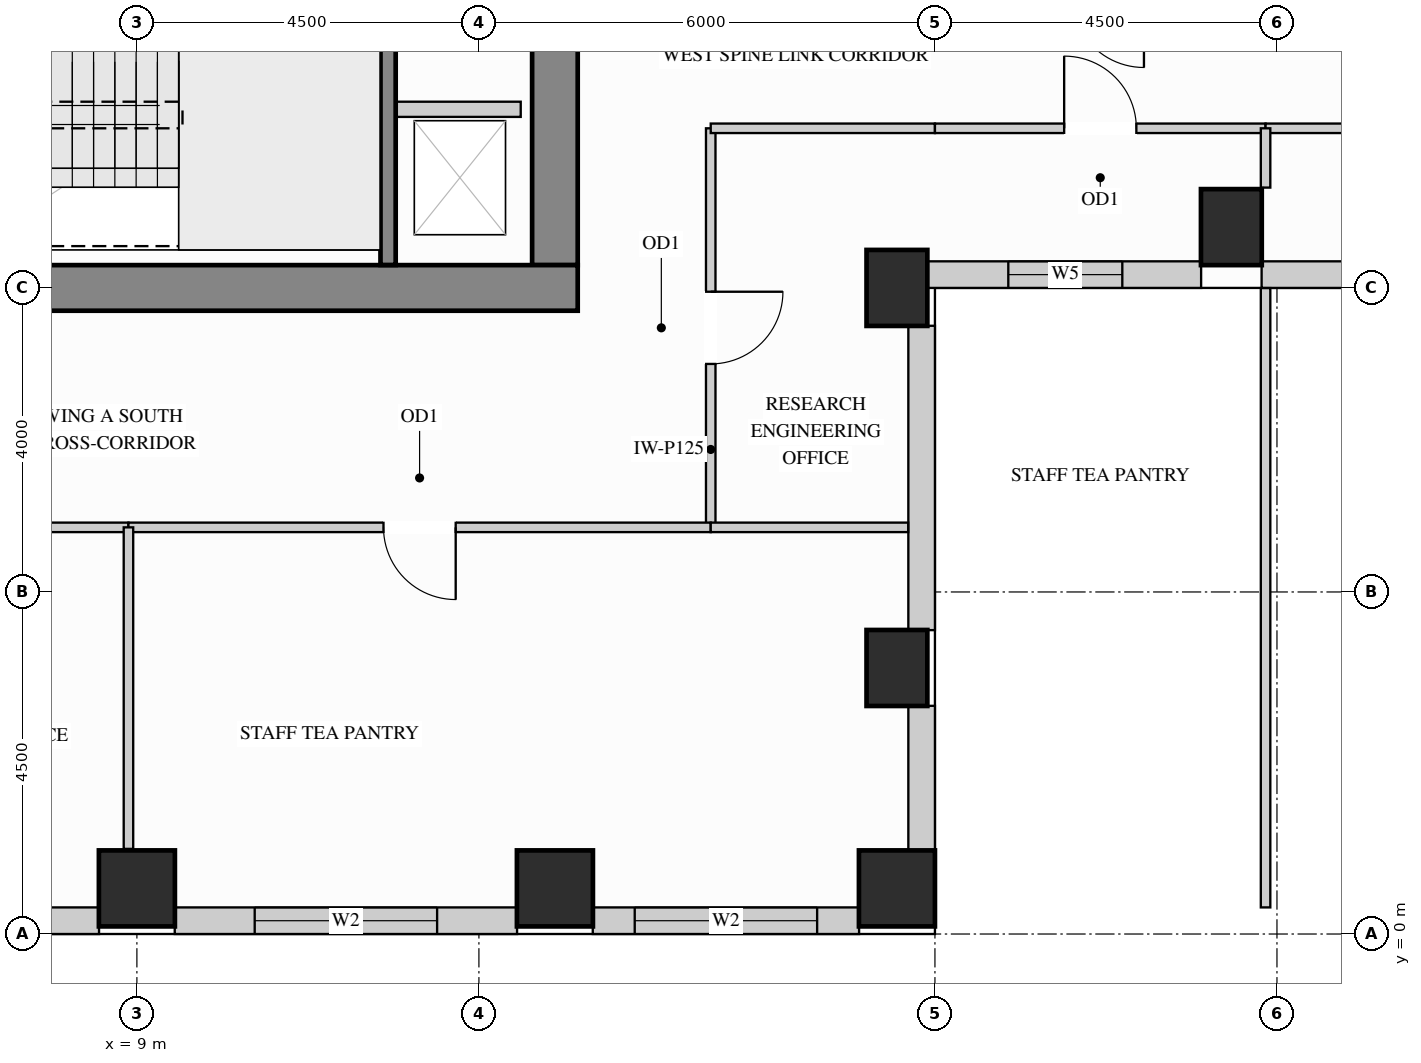
"""IFC4 building model, lengths in metres.
Left out: names, types, materials, properties, quantities, classifications, styles, units other than length and angle.
Written with IfcOpenShell. Run it as: python <this file> out.ifc"""

import sys

from ifc_helpers import new_model, si_unit, direction, frame, frame_2d, origin, origin_2d, place, context, subcontext, project, spatial, rectangle, extrude, source, transform, mapped, element, fill, save


model = new_model("IFC4")
c1 = context("Model", 3, precision=1e-05, world=origin(), true_north=direction((0.0, 1.0)))
c2 = subcontext(c1, "Body", "Model", "MODEL_VIEW")
j1 = project(units=[si_unit("LENGTHUNIT", "METRE"), si_unit("PLANEANGLEUNIT", "RADIAN")], contexts=[c1])
p1 = place(None, origin())
s1 = spatial("IfcSite", under=j1, at=p1, CompositionType="ELEMENT")
p2 = place(p1, origin())
s2 = spatial("IfcBuilding", under=s1, at=p2, CompositionType="ELEMENT")
p3 = place(p2, frame((0.0, 0.0, 186.3)))
s3 = spatial("IfcBuildingStorey", under=s2, at=p3, CompositionType="ELEMENT", Elevation=186.3)
m1 = source(origin(), c2, "Body", "SweptSolid", [
    extrude(rectangle(XDim=0.8, YDim=1.0, at=origin_2d()), origin(), (0.0, 0.0, 1.0), 3.4),
])
for number, where, z_axis, x_axis in (
    (1, (19.0, 3.5, 0.0), (0.0, 0.0, 1.0), (1.0, 0.0, 0.0)),
    (2, (19.0, 8.5, 0.0), (0.0, 0.0, 1.0), (1.0, 0.0, 0.0)),
    (3, (23.4, 9.3, 0.0), (0.0, 0.0, 1.0), (1.0, 0.0, 0.0)),
):
    element("IfcColumn", number, at=place(p3, frame(where, z_axis=z_axis, x_axis=x_axis)), inside=s3, PredefinedType="COLUMN", context=c2, shape_type="MappedRepresentation", body=[
        mapped(m1, transform((0.0, 0.0, 0.0), x_axis=(1.0, 0.0, 0.0), y_axis=(0.0, 1.0, 0.0), z_axis=(0.0, 0.0, 1.0))),
    ])
m2 = source(origin(), c2, "Body", "SweptSolid", [
    extrude(rectangle(XDim=1.0, YDim=1.0, at=origin_2d()), origin(), (0.0, 0.0, 1.0), 3.4),
])
for number, where, z_axis, x_axis in (
    (4, (14.5, 0.6, 0.0), (0.0, 0.0, 1.0), (1.0, 0.0, 0.0)),
    (5, (19.0, 0.6, 0.0), (0.0, 0.0, 1.0), (1.0, 0.0, 0.0)),
    (6, (9.0, 0.6, 0.0), (0.0, 0.0, 1.0), (1.0, 0.0, 0.0)),
):
    element("IfcColumn", number, at=place(p3, frame(where, z_axis=z_axis, x_axis=x_axis)), inside=s3, PredefinedType="COLUMN", context=c2, shape_type="MappedRepresentation", body=[
        mapped(m2, transform((0.0, 0.0, 0.0), x_axis=(1.0, 0.0, 0.0), y_axis=(0.0, 1.0, 0.0), z_axis=(0.0, 0.0, 1.0))),
    ])
m3 = source(origin(), c2, "Body", "SweptSolid", [
    extrude(rectangle(XDim=10.02, YDim=0.6, at=frame_2d((5.01, 0.0))), origin(), (0.0, 0.0, 1.0), 3.4),
])
p4 = place(p3, frame((14.5, 8.8, 0.0), z_axis=(0.0, 0.0, 1.0), x_axis=(0.0, 1.0, 0.0)))
e7 = element("IfcWall", 7, at=p4, inside=s3, PredefinedType="SHEAR", context=c2, shape_type="MappedRepresentation", body=[
    mapped(m3, transform((0.0, 0.0, 0.0), x_axis=(1.0, 0.0, 0.0), y_axis=(0.0, 1.0, 0.0), z_axis=(0.0, 0.0, 1.0))),
])
m4 = source(origin(), c2, "Body", "SweptSolid", [
    extrude(rectangle(XDim=10.6, YDim=0.6, at=frame_2d((5.3, 0.0))), origin(), (0.0, 0.0, 1.0), 3.4),
])
p5 = place(p3, frame((4.2, 8.5, 0.0), z_axis=(0.0, 0.0, 1.0), x_axis=(1.0, 0.0, 0.0)))
e8 = element("IfcWall", 8, at=p5, inside=s3, PredefinedType="SHEAR", context=c2, shape_type="MappedRepresentation", body=[
    mapped(m4, transform((0.0, 0.0, 0.0), x_axis=(1.0, 0.0, 0.0), y_axis=(0.0, 1.0, 0.0), z_axis=(0.0, 0.0, 1.0))),
])
p6 = place(p3, frame((3.998, 0.175, 0.0), z_axis=(0.0, 0.0, 1.0), x_axis=(1.0, 0.0, 0.0)))
e9 = element("IfcWall", 9, at=p6, inside=s3, PredefinedType="SOLIDWALL", context=c2, shape_type="SweptSolid", body=[
    extrude(rectangle(XDim=4.504, YDim=0.35, at=frame_2d((2.252, 0.0))), origin(), (0.0, 0.0, 1.0), 2.612),
])
p7 = place(p6, frame((1.052, 0.0, 0.78)))
e10 = element("IfcOpeningElement", 10, at=p7, cuts=e9, PredefinedType="OPENING", context=c2, shape_type="SweptSolid", body=[
    extrude(rectangle(XDim=2.4, YDim=1.652, at=frame_2d((1.2, 0.826))), frame((0.0, 0.185, 0.0), z_axis=(0.0, -1.0, 0.0), x_axis=(1.0, 0.0, 0.0)), (0.0, 0.0, 1.0), 0.37),
])
p8 = place(p3, frame((9.498, 0.175, 0.0), z_axis=(0.0, 0.0, 1.0), x_axis=(1.0, 0.0, 0.0)))
e11 = element("IfcWall", 11, at=p8, inside=s3, PredefinedType="SOLIDWALL", context=c2, shape_type="SweptSolid", body=[
    extrude(rectangle(XDim=4.504, YDim=0.35, at=frame_2d((2.252, 0.0))), origin(), (0.0, 0.0, 1.0), 2.612),
])
p9 = place(p8, frame((1.052, 0.0, 0.78)))
e12 = element("IfcOpeningElement", 12, at=p9, cuts=e11, PredefinedType="OPENING", context=c2, shape_type="SweptSolid", body=[
    extrude(rectangle(XDim=2.4, YDim=1.652, at=frame_2d((1.2, 0.826))), frame((0.0, 0.185, 0.0), z_axis=(0.0, -1.0, 0.0), x_axis=(1.0, 0.0, 0.0)), (0.0, 0.0, 1.0), 0.37),
])
p10 = place(p3, frame((14.998, 0.175, 0.0), z_axis=(0.0, 0.0, 1.0), x_axis=(1.0, 0.0, 0.0)))
e13 = element("IfcWall", 13, at=p10, inside=s3, PredefinedType="SOLIDWALL", context=c2, shape_type="SweptSolid", body=[
    extrude(rectangle(XDim=3.504, YDim=0.35, at=frame_2d((1.752, 0.0))), origin(), (0.0, 0.0, 1.0), 2.612),
])
p11 = place(p10, frame((0.552, 0.0, 0.78)))
e14 = element("IfcOpeningElement", 14, at=p11, cuts=e13, PredefinedType="OPENING", context=c2, shape_type="SweptSolid", body=[
    extrude(rectangle(XDim=2.4, YDim=1.652, at=frame_2d((1.2, 0.826))), frame((0.0, 0.185, 0.0), z_axis=(0.0, -1.0, 0.0), x_axis=(1.0, 0.0, 0.0)), (0.0, 0.0, 1.0), 0.37),
])
m5 = source(origin(), c2, "Body", "SweptSolid", [
    extrude(rectangle(XDim=1.904, YDim=0.35, at=frame_2d((0.952, 0.0))), origin(), (0.0, 0.0, 1.0), 2.612),
])
p12 = place(p3, frame((19.325, 1.098, 0.0), z_axis=(0.0, 0.0, 1.0), x_axis=(0.0, 1.0, 0.0)))
e15 = element("IfcWall", 15, at=p12, inside=s3, PredefinedType="SOLIDWALL", context=c2, shape_type="MappedRepresentation", body=[
    mapped(m5, transform((0.0, 0.0, 0.0), x_axis=(1.0, 0.0, 0.0), y_axis=(0.0, 1.0, 0.0), z_axis=(0.0, 0.0, 1.0))),
])
m6 = source(origin(), c2, "Body", "SweptSolid", [
    extrude(rectangle(XDim=4.004, YDim=0.35, at=frame_2d((2.002, 0.0))), origin(), (0.0, 0.0, 1.0), 2.612),
])
p13 = place(p3, frame((19.325, 3.998, 0.0), z_axis=(0.0, 0.0, 1.0), x_axis=(0.0, 1.0, 0.0)))
e16 = element("IfcWall", 16, at=p13, inside=s3, PredefinedType="SOLIDWALL", context=c2, shape_type="MappedRepresentation", body=[
    mapped(m6, transform((0.0, 0.0, 0.0), x_axis=(1.0, 0.0, 0.0), y_axis=(0.0, 1.0, 0.0), z_axis=(0.0, 0.0, 1.0))),
])
p14 = place(p3, frame((19.398, 8.675, 0.0), z_axis=(0.0, 0.0, 1.0), x_axis=(1.0, 0.0, 0.0)))
e17 = element("IfcWall", 17, at=p14, inside=s3, PredefinedType="SOLIDWALL", context=c2, shape_type="SweptSolid", body=[
    extrude(rectangle(XDim=3.604, YDim=0.35, at=frame_2d((1.802, 0.0))), origin(), (0.0, 0.0, 1.0), 3.385),
])
p15 = place(p14, frame((1.067, 0.0, 0.78)))
e18 = element("IfcOpeningElement", 18, at=p15, cuts=e17, PredefinedType="OPENING", context=c2, shape_type="SweptSolid", body=[
    extrude(rectangle(XDim=1.5, YDim=2.0, at=frame_2d((0.75, 1.0))), frame((0.0, 0.185, 0.0), z_axis=(0.0, -1.0, 0.0), x_axis=(1.0, 0.0, 0.0)), (0.0, 0.0, 1.0), 0.37),
])
p16 = place(p3, frame((23.798, 8.675, 0.0), z_axis=(0.0, 0.0, 1.0), x_axis=(1.0, 0.0, 0.0)))
e19 = element("IfcWall", 19, at=p16, inside=s3, PredefinedType="SOLIDWALL", context=c2, shape_type="SweptSolid", body=[
    extrude(rectangle(XDim=6.304, YDim=0.35, at=frame_2d((3.152, 0.0))), origin(), (0.0, 0.0, 1.0), 3.385),
])
p17 = place(p16, frame((1.147, 0.0, 0.78)))
e20 = element("IfcOpeningElement", 20, at=p17, cuts=e19, PredefinedType="OPENING", context=c2, shape_type="SweptSolid", body=[
    extrude(rectangle(XDim=1.5, YDim=2.0, at=frame_2d((0.75, 1.0))), frame((0.0, 0.185, 0.0), z_axis=(0.0, -1.0, 0.0), x_axis=(1.0, 0.0, 0.0)), (0.0, 0.0, 1.0), 0.37),
])
p18 = place(p16, frame((3.475, 0.0, 0.78)))
e21 = element("IfcOpeningElement", 21, at=p18, cuts=e19, PredefinedType="OPENING", context=c2, shape_type="SweptSolid", body=[
    extrude(rectangle(XDim=1.5, YDim=2.0, at=frame_2d((0.75, 1.0))), frame((0.0, 0.185, 0.0), z_axis=(0.0, -1.0, 0.0), x_axis=(1.0, 0.0, 0.0)), (0.0, 0.0, 1.0), 0.37),
])
p19 = place(p3, frame((16.55, 5.35, 0.0), z_axis=(0.0, 0.0, 1.0), x_axis=(0.0, 1.0, 0.0)))
e22 = element("IfcWall", 22, at=p19, inside=s3, PredefinedType="PARTITIONING", context=c2, shape_type="SweptSolid", body=[
    extrude(rectangle(XDim=5.25, YDim=0.125, at=frame_2d((2.625, 0.0))), origin(), (0.0, 0.0, 1.0), 3.385),
])
p20 = place(p19, frame((2.15, 0.0, 0.0)))
e23 = element("IfcOpeningElement", 23, at=p20, cuts=e22, PredefinedType="OPENING", context=c2, shape_type="SweptSolid", body=[
    extrude(rectangle(XDim=0.95, YDim=2.15, at=frame_2d((0.475, 1.075))), frame((0.0, 0.073, 0.0), z_axis=(0.0, -1.0, 0.0), x_axis=(1.0, 0.0, 0.0)), (0.0, 0.0, 1.0), 0.145),
])
m7 = source(origin(), c2, "Body", "SweptSolid", [
    extrude(rectangle(XDim=2.95, YDim=0.125, at=frame_2d((1.475, 0.0))), origin(), (0.0, 0.0, 1.0), 3.385),
])
p21 = place(p3, frame((16.55, 10.6, 0.0), z_axis=(0.0, 0.0, 1.0), x_axis=(1.0, 0.0, 0.0)))
e24 = element("IfcWall", 24, at=p21, inside=s3, PredefinedType="PARTITIONING", context=c2, shape_type="MappedRepresentation", body=[
    mapped(m7, transform((0.0, 0.0, 0.0), x_axis=(1.0, 0.0, 0.0), y_axis=(0.0, 1.0, 0.0), z_axis=(0.0, 0.0, 1.0))),
])
p22 = place(p3, frame((19.5, 10.6, 0.0), z_axis=(0.0, 0.0, 1.0), x_axis=(1.0, 0.0, 0.0)))
e25 = element("IfcWall", 25, at=p22, inside=s3, PredefinedType="PARTITIONING", context=c2, shape_type="SweptSolid", body=[
    extrude(rectangle(XDim=4.35, YDim=0.125, at=frame_2d((2.175, 0.0))), origin(), (0.0, 0.0, 1.0), 3.385),
])
p23 = place(p22, frame((1.7, 0.0, 0.0)))
e26 = element("IfcOpeningElement", 26, at=p23, cuts=e25, PredefinedType="OPENING", context=c2, shape_type="SweptSolid", body=[
    extrude(rectangle(XDim=0.95, YDim=2.15, at=frame_2d((0.475, 1.075))), frame((0.0, 0.073, 0.0), z_axis=(0.0, -1.0, 0.0), x_axis=(1.0, 0.0, 0.0)), (0.0, 0.0, 1.0), 0.145),
])
p24 = place(p3, frame((23.85, 10.6, 0.0), z_axis=(0.0, 0.0, 1.0), x_axis=(1.0, 0.0, 0.0)))
e27 = element("IfcWall", 27, at=p24, inside=s3, PredefinedType="PARTITIONING", context=c2, shape_type="SweptSolid", body=[
    extrude(rectangle(XDim=6.0, YDim=0.125, at=frame_2d((3.0, 0.0))), origin(), (0.0, 0.0, 1.0), 3.385),
])
p25 = place(p24, frame((2.525, 0.0, 0.0)))
e28 = element("IfcOpeningElement", 28, at=p25, cuts=e27, PredefinedType="OPENING", context=c2, shape_type="SweptSolid", body=[
    extrude(rectangle(XDim=0.95, YDim=2.15, at=frame_2d((0.475, 1.075))), frame((0.0, 0.073, 0.0), z_axis=(0.0, -1.0, 0.0), x_axis=(1.0, 0.0, 0.0)), (0.0, 0.0, 1.0), 0.145),
])
m8 = source(origin(), c2, "Body", "SweptSolid", [
    extrude(rectangle(XDim=8.148, YDim=0.125, at=frame_2d((4.074, 0.0))), origin(), (0.0, 0.0, 1.0), 3.385),
])
p26 = place(p3, frame((23.85, 0.35, 0.0), z_axis=(0.0, 0.0, 1.0), x_axis=(0.0, 1.0, 0.0)))
e29 = element("IfcWall", 29, at=p26, inside=s3, PredefinedType="PARTITIONING", context=c2, shape_type="MappedRepresentation", body=[
    mapped(m8, transform((0.0, 0.0, 0.0), x_axis=(1.0, 0.0, 0.0), y_axis=(0.0, 1.0, 0.0), z_axis=(0.0, 0.0, 1.0))),
])
m9 = source(origin(), c2, "Body", "SweptSolid", [
    extrude(rectangle(XDim=0.78, YDim=0.125, at=frame_2d((0.39, 0.0))), origin(), (0.0, 0.0, 1.0), 3.385),
])
p27 = place(p3, frame((23.85, 9.82, 0.0), z_axis=(0.0, 0.0, 1.0), x_axis=(0.0, 1.0, 0.0)))
e30 = element("IfcWall", 30, at=p27, inside=s3, PredefinedType="PARTITIONING", context=c2, shape_type="MappedRepresentation", body=[
    mapped(m9, transform((0.0, 0.0, 0.0), x_axis=(1.0, 0.0, 0.0), y_axis=(0.0, 1.0, 0.0), z_axis=(0.0, 0.0, 1.0))),
])
p28 = place(p3, frame((2.45, 5.35, 0.0), z_axis=(0.0, 0.0, 1.0), x_axis=(1.0, 0.0, 0.0)))
e31 = element("IfcWall", 31, at=p28, inside=s3, PredefinedType="PARTITIONING", context=c2, shape_type="SweptSolid", body=[
    extrude(rectangle(XDim=6.439, YDim=0.125, at=frame_2d((3.219, 0.0))), origin(), (0.0, 0.0, 1.0), 3.385),
])
p29 = place(p28, frame((2.744, 0.0, 0.0)))
e32 = element("IfcOpeningElement", 32, at=p29, cuts=e31, PredefinedType="OPENING", context=c2, shape_type="SweptSolid", body=[
    extrude(rectangle(XDim=0.95, YDim=2.15, at=frame_2d((0.475, 1.075))), frame((0.0, 0.073, 0.0), z_axis=(0.0, -1.0, 0.0), x_axis=(1.0, 0.0, 0.0)), (0.0, 0.0, 1.0), 0.145),
])
p30 = place(p3, frame((8.889, 5.35, 0.0), z_axis=(0.0, 0.0, 1.0), x_axis=(1.0, 0.0, 0.0)))
e33 = element("IfcWall", 33, at=p30, inside=s3, PredefinedType="PARTITIONING", context=c2, shape_type="SweptSolid", body=[
    extrude(rectangle(XDim=7.661, YDim=0.125, at=frame_2d((3.831, 0.0))), origin(), (0.0, 0.0, 1.0), 3.385),
])
p31 = place(p30, frame((3.355, 0.0, 0.0)))
e34 = element("IfcOpeningElement", 34, at=p31, cuts=e33, PredefinedType="OPENING", context=c2, shape_type="SweptSolid", body=[
    extrude(rectangle(XDim=0.95, YDim=2.15, at=frame_2d((0.475, 1.075))), frame((0.0, 0.073, 0.0), z_axis=(0.0, -1.0, 0.0), x_axis=(1.0, 0.0, 0.0)), (0.0, 0.0, 1.0), 0.145),
])
m10 = source(origin(), c2, "Body", "SweptSolid", [
    extrude(rectangle(XDim=2.598, YDim=0.125, at=frame_2d((1.299, 0.0))), origin(), (0.0, 0.0, 1.0), 3.385),
])
p32 = place(p3, frame((16.55, 5.35, 0.0), z_axis=(0.0, 0.0, 1.0), x_axis=(1.0, 0.0, 0.0)))
e35 = element("IfcWall", 35, at=p32, inside=s3, PredefinedType="PARTITIONING", context=c2, shape_type="MappedRepresentation", body=[
    mapped(m10, transform((0.0, 0.0, 0.0), x_axis=(1.0, 0.0, 0.0), y_axis=(0.0, 1.0, 0.0), z_axis=(0.0, 0.0, 1.0))),
])
m11 = source(origin(), c2, "Body", "SweptSolid", [
    extrude(rectangle(XDim=4.23, YDim=0.125, at=frame_2d((2.115, 0.0))), origin(), (0.0, 0.0, 1.0), 3.385),
])
p33 = place(p3, frame((8.889, 1.12, 0.0), z_axis=(0.0, 0.0, 1.0), x_axis=(0.0, 1.0, 0.0)))
e36 = element("IfcWall", 36, at=p33, inside=s3, PredefinedType="PARTITIONING", context=c2, shape_type="MappedRepresentation", body=[
    mapped(m11, transform((0.0, 0.0, 0.0), x_axis=(1.0, 0.0, 0.0), y_axis=(0.0, 1.0, 0.0), z_axis=(0.0, 0.0, 1.0))),
])
m12 = source(origin(), c2, "Body", "SweptSolid", [
    extrude(rectangle(XDim=1.63, YDim=0.2, at=frame_2d((0.815, 0.0))), origin(), (0.0, 0.0, 1.0), 3.385),
])
p34 = place(p3, frame((12.42, 10.85, 0.0), z_axis=(0.0, 0.0, 1.0), x_axis=(1.0, 0.0, 0.0)))
e37 = element("IfcWall", 37, at=p34, inside=s3, PredefinedType="PARTITIONING", context=c2, shape_type="MappedRepresentation", body=[
    mapped(m12, transform((0.0, 0.0, 0.0), x_axis=(1.0, 0.0, 0.0), y_axis=(0.0, 1.0, 0.0), z_axis=(0.0, 0.0, 1.0))),
])
m13 = source(origin(), c2, "Body", "SweptSolid", [
    extrude(rectangle(XDim=3.753, YDim=0.2, at=frame_2d((1.876, 0.0))), origin(), (0.0, 0.0, 1.0), 3.4),
])
p35 = place(p3, frame((12.305, 8.802, 0.0), z_axis=(0.0, 0.0, 1.0), x_axis=(0.0, 1.0, 0.0)))
e38 = element("IfcWall", 38, at=p35, inside=s3, PredefinedType="SHEAR", context=c2, shape_type="MappedRepresentation", body=[
    mapped(m13, transform((0.0, 0.0, 0.0), x_axis=(1.0, 0.0, 0.0), y_axis=(0.0, 1.0, 0.0), z_axis=(0.0, 0.0, 1.0))),
])
m14 = source(origin(), c2, "Body", "SweptSolid", [
    extrude(rectangle(XDim=0.95, YDim=2.15, at=frame_2d((0.475, 1.075))), frame((0.0, 0.025, 0.0), z_axis=(0.0, -1.0, 0.0), x_axis=(1.0, 0.0, 0.0)), (0.0, 0.0, 1.0), 0.05),
])
p36 = place(p20, origin())
e39 = element("IfcDoor", 39, at=p36, inside=s3, OperationType="SINGLE_SWING_RIGHT", PredefinedType="DOOR", context=c2, shape_type="MappedRepresentation", body=[
    mapped(m14, transform((0.0, 0.0, 0.0), x_axis=(1.0, 0.0, 0.0), y_axis=(0.0, 1.0, 0.0), z_axis=(0.0, 0.0, 1.0))),
])
fill(e23, e39)
p37 = place(p31, origin())
e40 = element("IfcDoor", 40, at=p37, inside=s3, OperationType="SINGLE_SWING_RIGHT", PredefinedType="DOOR", context=c2, shape_type="MappedRepresentation", body=[
    mapped(m14, transform((0.0, 0.0, 0.0), x_axis=(1.0, 0.0, 0.0), y_axis=(0.0, 1.0, 0.0), z_axis=(0.0, 0.0, 1.0))),
])
fill(e34, e40)
p38 = place(p23, origin())
e41 = element("IfcDoor", 41, at=p38, inside=s3, OperationType="SINGLE_SWING_LEFT", PredefinedType="DOOR", context=c2, shape_type="MappedRepresentation", body=[
    mapped(m14, transform((0.0, 0.0, 0.0), x_axis=(1.0, 0.0, 0.0), y_axis=(0.0, 1.0, 0.0), z_axis=(0.0, 0.0, 1.0))),
])
fill(e26, e41)
m15 = source(origin(), c2, "Body", "SweptSolid", [
    extrude(rectangle(XDim=2.4, YDim=1.652, at=frame_2d((1.2, 0.826))), frame((0.0, 0.03, 0.0), z_axis=(0.0, -1.0, 0.0), x_axis=(1.0, 0.0, 0.0)), (0.0, 0.0, 1.0), 0.06),
])
p39 = place(p9, origin())
e42 = element("IfcWindow", 42, at=p39, inside=s3, PartitioningType="SINGLE_PANEL", PredefinedType="WINDOW", context=c2, shape_type="MappedRepresentation", body=[
    mapped(m15, transform((0.0, 0.0, 0.0), x_axis=(1.0, 0.0, 0.0), y_axis=(0.0, 1.0, 0.0), z_axis=(0.0, 0.0, 1.0))),
])
fill(e12, e42)
p40 = place(p11, origin())
e43 = element("IfcWindow", 43, at=p40, inside=s3, PartitioningType="SINGLE_PANEL", PredefinedType="WINDOW", context=c2, shape_type="MappedRepresentation", body=[
    mapped(m15, transform((0.0, 0.0, 0.0), x_axis=(1.0, 0.0, 0.0), y_axis=(0.0, 1.0, 0.0), z_axis=(0.0, 0.0, 1.0))),
])
fill(e14, e43)
m16 = source(origin(), c2, "Body", "SweptSolid", [
    extrude(rectangle(XDim=1.5, YDim=2.0, at=frame_2d((0.75, 1.0))), frame((0.0, 0.03, 0.0), z_axis=(0.0, -1.0, 0.0), x_axis=(1.0, 0.0, 0.0)), (0.0, 0.0, 1.0), 0.06),
])
p41 = place(p15, origin())
e44 = element("IfcWindow", 44, at=p41, inside=s3, PartitioningType="SINGLE_PANEL", PredefinedType="WINDOW", context=c2, shape_type="MappedRepresentation", body=[
    mapped(m16, transform((0.0, 0.0, 0.0), x_axis=(1.0, 0.0, 0.0), y_axis=(0.0, 1.0, 0.0), z_axis=(0.0, 0.0, 1.0))),
])
fill(e18, e44)
save(model, sys.argv[1])
